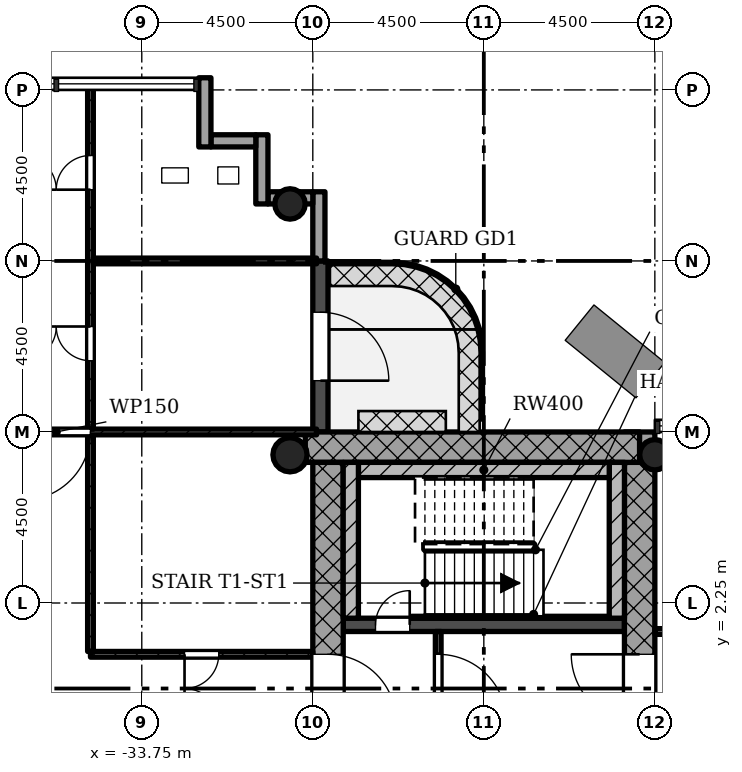
"""IFC4 building model, lengths in metres.
Left out: names, types, materials, properties, quantities, classifications, styles, units other than length and angle.
Written with IfcOpenShell. Run it as: python <this file> out.ifc"""

import sys

from ifc_helpers import new_model, si_unit, direction, frame, frame_2d, origin, origin_2d, place, context, subcontext, project, spatial, rectangle, hollow_circle, extrude, element, fill, save


model = new_model("IFC4")
c1 = context("Model", 3, precision=1e-05, world=origin(), true_north=direction((0.0, 1.0)))
c2 = subcontext(c1, "Body", "Model", "MODEL_VIEW")
j1 = project(units=[si_unit("LENGTHUNIT", "METRE"), si_unit("PLANEANGLEUNIT", "RADIAN")], contexts=[c1])
p1 = place(None, origin())
s1 = spatial("IfcSite", under=j1, at=p1, CompositionType="ELEMENT")
p2 = place(p1, origin())
s2 = spatial("IfcBuilding", under=s1, at=p2, CompositionType="ELEMENT")
p3 = place(p2, frame((0.0, 0.0, 181.3)))
s3 = spatial("IfcBuildingStorey", under=s2, at=p3, CompositionType="ELEMENT", Elevation=181.3)
p4 = place(p3, frame((-20.65, -5.95, 0.0), z_axis=(0.0, 0.0, 1.0), x_axis=(0.0, 1.0, 0.0)))
e1 = element("IfcWall", 1, at=p4, inside=s3, PredefinedType="SHEAR", context=c2, shape_type="SweptSolid", body=[
    extrude(rectangle(XDim=12.7, YDim=0.8, at=frame_2d((6.35, 0.0))), origin(), (0.0, 0.0, 1.0), 4.5),
])
p5 = place(p4, frame((5.05, 0.0, 0.0)))
e2 = element("IfcOpeningElement", 2, at=p5, cuts=e1, PredefinedType="OPENING", context=c2, shape_type="SweptSolid", body=[
    extrude(rectangle(XDim=1.8, YDim=2.1, at=frame_2d((0.9, 1.05))), frame((0.0, 0.41, 0.0), z_axis=(0.0, -1.0, 0.0), x_axis=(1.0, 0.0, 0.0)), (0.0, 0.0, 1.0), 0.82),
])
p6 = place(p3, frame((-20.652, 6.35, 0.0), z_axis=(0.0, 0.0, 1.0), x_axis=(-1.0, 0.0, 0.0)))
e3 = element("IfcWall", 3, at=p6, inside=s3, PredefinedType="SHEAR", context=c2, shape_type="SweptSolid", body=[
    extrude(rectangle(XDim=8.796, YDim=0.8, at=frame_2d((4.398, 0.0))), origin(), (0.0, 0.0, 1.0), 4.5),
])
p7 = place(p3, frame((-28.85, 5.95, 0.0), z_axis=(0.0, 0.0, 1.0), x_axis=(0.0, -1.0, 0.0)))
e4 = element("IfcWall", 4, at=p7, inside=s3, PredefinedType="SHEAR", context=c2, shape_type="SweptSolid", body=[
    extrude(rectangle(XDim=12.7, YDim=0.8, at=frame_2d((6.35, 0.0))), origin(), (0.0, 0.0, 1.0), 4.5),
])
p8 = place(p7, frame((5.05, 0.0, 0.0)))
e5 = element("IfcOpeningElement", 5, at=p8, cuts=e4, PredefinedType="OPENING", context=c2, shape_type="SweptSolid", body=[
    extrude(rectangle(XDim=1.8, YDim=2.1, at=frame_2d((0.9, 1.05))), frame((0.0, 0.41, 0.0), z_axis=(0.0, -1.0, 0.0), x_axis=(1.0, 0.0, 0.0)), (0.0, 0.0, 1.0), 0.82),
])
p9 = place(p3, frame((-28.45, 1.675, 0.0), z_axis=(0.0, 0.0, 1.0), x_axis=(1.0, 0.0, 0.0)))
e6 = element("IfcWall", 6, at=p9, inside=s3, PredefinedType="SHEAR", context=c2, shape_type="SweptSolid", body=[
    extrude(rectangle(XDim=7.4, YDim=0.35, at=frame_2d((3.7, 0.0))), origin(), (0.0, 0.0, 1.0), 4.5),
])
p10 = place(p9, frame((0.85, 0.0, 0.0)))
e7 = element("IfcOpeningElement", 7, at=p10, cuts=e6, PredefinedType="OPENING", context=c2, shape_type="SweptSolid", body=[
    extrude(rectangle(XDim=0.9, YDim=2.1, at=frame_2d((0.45, 1.05))), frame((0.0, 0.185, 0.0), z_axis=(0.0, -1.0, 0.0), x_axis=(1.0, 0.0, 0.0)), (0.0, 0.0, 1.0), 0.37),
])
for number, where, z_axis, x_axis in (
    (8, (-20.25, 6.15, 0.0), (0.0, 0.0, 1.0), (1.0, 0.0, 0.0)),
    (9, (-29.85, 12.75, 0.0), (0.0, 0.0, 1.0), (1.0, 0.0, 0.0)),
):
    element("IfcColumn", number, at=place(p3, frame(where, z_axis=z_axis, x_axis=x_axis)), inside=s3, PredefinedType="COLUMN", context=c2, shape_type="SweptSolid", body=[
        extrude(hollow_circle(Radius=0.4, WallThickness=0.028, at=origin_2d()), origin(), (0.0, 0.0, 1.0), 4.5),
    ])
p11 = place(p3, frame((-29.85, 6.15, 0.0), z_axis=(0.0, 0.0, 1.0), x_axis=(1.0, 0.0, 0.0)))
e10 = element("IfcColumn", 10, at=p11, inside=s3, PredefinedType="COLUMN", context=c2, shape_type="SweptSolid", body=[
    extrude(hollow_circle(Radius=0.45, WallThickness=0.032, at=origin_2d()), origin(), (0.0, 0.0, 1.0), 4.5),
])
p12 = place(p3, frame((-29.05, 6.75, -0.02), z_axis=(0.0, 0.0, 1.0), x_axis=(0.0, 1.0, 0.0)))
e11 = element("IfcWall", 11, at=p12, inside=s3, PredefinedType="STANDARD", context=c2, shape_type="SweptSolid", body=[
    extrude(rectangle(XDim=4.5, YDim=0.4, at=frame_2d((2.25, 0.0))), origin(), (0.0, 0.0, 1.0), 4.22),
])
p13 = place(p12, frame((1.35, 0.0, 0.02)))
e12 = element("IfcOpeningElement", 12, at=p13, cuts=e11, PredefinedType="OPENING", context=c2, shape_type="SweptSolid", body=[
    extrude(rectangle(XDim=1.8, YDim=2.1, at=frame_2d((0.9, 1.05))), frame((0.0, 0.21, 0.0), z_axis=(0.0, -1.0, 0.0), x_axis=(1.0, 0.0, 0.0)), (0.0, 0.0, 1.0), 0.42),
])
p14 = place(p3, frame((-29.09, 11.25, -0.3), z_axis=(0.0, 0.0, 1.0), x_axis=(0.0, 1.0, 0.0)))
e13 = element("IfcWall", 13, at=p14, inside=s3, PredefinedType="STANDARD", context=c2, shape_type="SweptSolid", body=[
    extrude(rectangle(XDim=1.82, YDim=0.32, at=frame_2d((0.91, 0.0))), origin(), (0.0, 0.0, 1.0), 4.5),
])
p15 = place(p3, frame((-29.25, 12.91, -0.3), z_axis=(0.0, 0.0, 1.0), x_axis=(-1.0, 0.0, 0.0)))
e14 = element("IfcWall", 14, at=p15, inside=s3, PredefinedType="STANDARD", context=c2, shape_type="SweptSolid", body=[
    extrude(rectangle(XDim=1.18, YDim=0.32, at=frame_2d((0.59, 0.0))), origin(), (0.0, 0.0, 1.0), 4.5),
])
p16 = place(p3, frame((-30.59, 12.75, -0.3), z_axis=(0.0, 0.0, 1.0), x_axis=(0.0, 1.0, 0.0)))
e15 = element("IfcWall", 15, at=p16, inside=s3, PredefinedType="STANDARD", context=c2, shape_type="SweptSolid", body=[
    extrude(rectangle(XDim=1.82, YDim=0.32, at=frame_2d((0.91, 0.0))), origin(), (0.0, 0.0, 1.0), 4.5),
])
p17 = place(p3, frame((-30.75, 14.41, -0.3), z_axis=(0.0, 0.0, 1.0), x_axis=(-1.0, 0.0, 0.0)))
e16 = element("IfcWall", 16, at=p17, inside=s3, PredefinedType="STANDARD", context=c2, shape_type="SweptSolid", body=[
    extrude(rectangle(XDim=1.18, YDim=0.32, at=frame_2d((0.59, 0.0))), origin(), (0.0, 0.0, 1.0), 4.5),
])
p18 = place(p3, frame((-32.09, 14.25, -0.3), z_axis=(0.0, 0.0, 1.0), x_axis=(0.0, 1.0, 0.0)))
e17 = element("IfcWall", 17, at=p18, inside=s3, PredefinedType="STANDARD", context=c2, shape_type="SweptSolid", body=[
    extrude(rectangle(XDim=1.82, YDim=0.32, at=frame_2d((0.91, 0.0))), origin(), (0.0, 0.0, 1.0), 4.5),
])
p19 = place(p3, frame((-25.95, -1.5, 0.0), z_axis=(0.0, 0.0, 1.0), x_axis=(0.0, 1.0, 0.0)))
e18 = element("IfcWall", 18, at=p19, inside=s3, PredefinedType="PARTITIONING", context=c2, shape_type="SweptSolid", body=[
    extrude(rectangle(XDim=3.0, YDim=0.15, at=frame_2d((1.5, 0.0))), origin(), (0.0, 0.0, 1.0), 4.08),
])
p20 = place(p19, frame((0.6, 0.0, 0.0)))
e19 = element("IfcOpeningElement", 19, at=p20, cuts=e18, PredefinedType="OPENING", context=c2, shape_type="SweptSolid", body=[
    extrude(rectangle(XDim=1.8, YDim=2.1, at=frame_2d((0.9, 1.05))), frame((0.0, 0.085, 0.0), z_axis=(0.0, -1.0, 0.0), x_axis=(1.0, 0.0, 0.0)), (0.0, 0.0, 1.0), 0.17),
])
p21 = place(p3, frame((-35.1, 0.9, 0.0), z_axis=(0.0, 0.0, 1.0), x_axis=(1.0, 0.0, 0.0)))
e20 = element("IfcWall", 20, at=p21, inside=s3, PredefinedType="PARTITIONING", context=c2, shape_type="SweptSolid", body=[
    extrude(rectangle(XDim=5.85, YDim=0.15, at=frame_2d((2.925, 0.0))), origin(), (0.0, 0.0, 1.0), 4.08),
])
p22 = place(p21, frame((2.475, 0.0, 0.0)))
e21 = element("IfcOpeningElement", 21, at=p22, cuts=e20, PredefinedType="OPENING", context=c2, shape_type="SweptSolid", body=[
    extrude(rectangle(XDim=0.9, YDim=2.1, at=frame_2d((0.45, 1.05))), frame((0.0, 0.085, 0.0), z_axis=(0.0, -1.0, 0.0), x_axis=(1.0, 0.0, 0.0)), (0.0, 0.0, 1.0), 0.17),
])
p23 = place(p3, frame((-35.1, 0.975, 0.0), z_axis=(0.0, 0.0, 1.0), x_axis=(0.0, 1.0, 0.0)))
e22 = element("IfcWall", 22, at=p23, inside=s3, PredefinedType="PARTITIONING", context=c2, shape_type="SweptSolid", body=[
    extrude(rectangle(XDim=5.7, YDim=0.15, at=frame_2d((2.85, 0.0))), origin(), (0.0, 0.0, 1.0), 4.08),
])
p24 = place(p3, frame((-20.25, 1.5, 0.0), z_axis=(0.0, 0.0, 1.0), x_axis=(1.0, 0.0, 0.0)))
e23 = element("IfcWall", 23, at=p24, inside=s3, PredefinedType="PARTITIONING", context=c2, shape_type="SweptSolid", body=[
    extrude(rectangle(XDim=9.1, YDim=0.15, at=frame_2d((4.55, 0.0))), origin(), (0.0, 0.0, 1.0), 4.08),
])
p25 = place(p24, frame((1.8, 0.0, 0.0)))
e24 = element("IfcOpeningElement", 24, at=p25, cuts=e23, PredefinedType="OPENING", context=c2, shape_type="SweptSolid", body=[
    extrude(rectangle(XDim=0.9, YDim=2.1, at=frame_2d((0.45, 1.05))), frame((0.0, 0.085, 0.0), z_axis=(0.0, -1.0, 0.0), x_axis=(1.0, 0.0, 0.0)), (0.0, 0.0, 1.0), 0.17),
])
p26 = place(p24, frame((6.3, 0.0, 0.0)))
e25 = element("IfcOpeningElement", 25, at=p26, cuts=e23, PredefinedType="OPENING", context=c2, shape_type="SweptSolid", body=[
    extrude(rectangle(XDim=0.9, YDim=2.1, at=frame_2d((0.45, 1.05))), frame((0.0, 0.085, 0.0), z_axis=(0.0, -1.0, 0.0), x_axis=(1.0, 0.0, 0.0)), (0.0, 0.0, 1.0), 0.17),
])
p27 = place(p3, frame((-42.85, 6.75, 0.0), z_axis=(0.0, 0.0, 1.0), x_axis=(1.0, 0.0, 0.0)))
e26 = element("IfcWall", 26, at=p27, inside=s3, PredefinedType="PARTITIONING", context=c2, shape_type="SweptSolid", body=[
    extrude(rectangle(XDim=13.7, YDim=0.15, at=frame_2d((6.85, 0.0))), origin(), (0.0, 0.0, 1.0), 4.08),
])
p28 = place(p27, frame((5.95, 0.0, 0.0)))
e27 = element("IfcOpeningElement", 27, at=p28, cuts=e26, PredefinedType="OPENING", context=c2, shape_type="SweptSolid", body=[
    extrude(rectangle(XDim=1.8, YDim=2.1, at=frame_2d((0.9, 1.05))), frame((0.0, 0.085, 0.0), z_axis=(0.0, -1.0, 0.0), x_axis=(1.0, 0.0, 0.0)), (0.0, 0.0, 1.0), 0.17),
])
p29 = place(p3, frame((-35.1, 6.825, 0.0), z_axis=(0.0, 0.0, 1.0), x_axis=(0.0, 1.0, 0.0)))
e28 = element("IfcWall", 28, at=p29, inside=s3, PredefinedType="PARTITIONING", context=c2, shape_type="SweptSolid", body=[
    extrude(rectangle(XDim=9.025, YDim=0.15, at=frame_2d((4.513, 0.0))), origin(), (0.0, 0.0, 1.0), 4.08),
])
p30 = place(p29, frame((1.8, 0.0, 0.0)))
e29 = element("IfcOpeningElement", 29, at=p30, cuts=e28, PredefinedType="OPENING", context=c2, shape_type="SweptSolid", body=[
    extrude(rectangle(XDim=0.9, YDim=2.1, at=frame_2d((0.45, 1.05))), frame((0.0, 0.085, 0.0), z_axis=(0.0, -1.0, 0.0), x_axis=(1.0, 0.0, 0.0)), (0.0, 0.0, 1.0), 0.17),
])
p31 = place(p29, frame((6.3, 0.0, 0.0)))
e30 = element("IfcOpeningElement", 30, at=p31, cuts=e28, PredefinedType="OPENING", context=c2, shape_type="SweptSolid", body=[
    extrude(rectangle(XDim=0.9, YDim=2.1, at=frame_2d((0.45, 1.05))), frame((0.0, 0.085, 0.0), z_axis=(0.0, -1.0, 0.0), x_axis=(1.0, 0.0, 0.0)), (0.0, 0.0, 1.0), 0.17),
])
p32 = place(p3, frame((-35.025, 11.25, 0.0), z_axis=(0.0, 0.0, 1.0), x_axis=(1.0, 0.0, 0.0)))
e31 = element("IfcWall", 31, at=p32, inside=s3, PredefinedType="PARTITIONING", context=c2, shape_type="SweptSolid", body=[
    extrude(rectangle(XDim=5.875, YDim=0.15, at=frame_2d((2.938, 0.0))), origin(), (0.0, 0.0, 1.0), 4.08),
])
p33 = place(p3, frame((-21.25, 1.85, 0.0), z_axis=(0.0, 0.0, 1.0), x_axis=(0.0, 1.0, 0.0)))
e32 = element("IfcWall", 32, at=p33, inside=s3, PredefinedType="SHEAR", context=c2, shape_type="SweptSolid", body=[
    extrude(rectangle(XDim=4.1, YDim=0.4, at=frame_2d((2.05, 0.0))), origin(), (0.0, 0.0, 1.0), 4.5),
])
p34 = place(p3, frame((-28.05, 5.75, 0.0), z_axis=(0.0, 0.0, 1.0), x_axis=(1.0, 0.0, 0.0)))
e33 = element("IfcWall", 33, at=p34, inside=s3, PredefinedType="SHEAR", context=c2, shape_type="SweptSolid", body=[
    extrude(rectangle(XDim=6.6, YDim=0.4, at=frame_2d((3.3, 0.0))), origin(), (0.0, 0.0, 1.0), 4.5),
])
p35 = place(p3, frame((-28.25, 1.85, 0.0), z_axis=(0.0, 0.0, 1.0), x_axis=(0.0, 1.0, 0.0)))
e34 = element("IfcWall", 34, at=p35, inside=s3, PredefinedType="SHEAR", context=c2, shape_type="SweptSolid", body=[
    extrude(rectangle(XDim=4.1, YDim=0.4, at=frame_2d((2.05, 0.0))), origin(), (0.0, 0.0, 1.0), 4.5),
])
p36 = place(p3, frame((-26.65, 1.875, 0.0), z_axis=(0.0, 0.0, 1.0), x_axis=(1.0, 0.0, 0.0)))
e35 = element("IfcWall", 35, at=p36, inside=s3, PredefinedType="SHEAR", context=c2, shape_type="SweptSolid", body=[
    extrude(rectangle(XDim=5.2, YDim=0.05, at=frame_2d((2.6, 0.0))), origin(), (0.0, 0.0, 1.0), 4.5),
])
p37 = place(p13, origin())
e36 = element("IfcDoor", 36, at=p37, inside=s3, OperationType="SINGLE_SWING_LEFT", PredefinedType="DOOR", context=c2, shape_type="SweptSolid", body=[
    extrude(rectangle(XDim=1.8, YDim=2.1, at=frame_2d((0.9, 1.05))), frame((0.0, 0.025, 0.0), z_axis=(0.0, -1.0, 0.0), x_axis=(1.0, 0.0, 0.0)), (0.0, 0.0, 1.0), 0.05),
])
fill(e12, e36)
p38 = place(p20, origin())
e37 = element("IfcDoor", 37, at=p38, inside=s3, OperationType="SINGLE_SWING_LEFT", PredefinedType="DOOR", context=c2, shape_type="SweptSolid", body=[
    extrude(rectangle(XDim=1.8, YDim=2.1, at=frame_2d((0.9, 1.05))), frame((0.0, 0.025, 0.0), z_axis=(0.0, -1.0, 0.0), x_axis=(1.0, 0.0, 0.0)), (0.0, 0.0, 1.0), 0.05),
])
fill(e19, e37)
p39 = place(p22, origin())
e38 = element("IfcDoor", 38, at=p39, inside=s3, OperationType="SINGLE_SWING_LEFT", PredefinedType="DOOR", context=c2, shape_type="SweptSolid", body=[
    extrude(rectangle(XDim=0.9, YDim=2.1, at=frame_2d((0.45, 1.05))), frame((0.0, 0.025, 0.0), z_axis=(0.0, -1.0, 0.0), x_axis=(1.0, 0.0, 0.0)), (0.0, 0.0, 1.0), 0.05),
])
fill(e21, e38)
p40 = place(p28, origin())
e39 = element("IfcDoor", 39, at=p40, inside=s3, OperationType="SINGLE_SWING_LEFT", PredefinedType="DOOR", context=c2, shape_type="SweptSolid", body=[
    extrude(rectangle(XDim=1.8, YDim=2.1, at=frame_2d((0.9, 1.05))), frame((0.0, 0.025, 0.0), z_axis=(0.0, -1.0, 0.0), x_axis=(1.0, 0.0, 0.0)), (0.0, 0.0, 1.0), 0.05),
])
fill(e27, e39)
p41 = place(p30, origin())
e40 = element("IfcDoor", 40, at=p41, inside=s3, OperationType="SINGLE_SWING_LEFT", PredefinedType="DOOR", context=c2, shape_type="SweptSolid", body=[
    extrude(rectangle(XDim=0.9, YDim=2.1, at=frame_2d((0.45, 1.05))), frame((0.0, 0.025, 0.0), z_axis=(0.0, -1.0, 0.0), x_axis=(1.0, 0.0, 0.0)), (0.0, 0.0, 1.0), 0.05),
])
fill(e29, e40)
p42 = place(p31, origin())
e41 = element("IfcDoor", 41, at=p42, inside=s3, OperationType="SINGLE_SWING_RIGHT", PredefinedType="DOOR", context=c2, shape_type="SweptSolid", body=[
    extrude(rectangle(XDim=0.9, YDim=2.1, at=frame_2d((0.45, 1.05))), frame((0.0, 0.025, 0.0), z_axis=(0.0, -1.0, 0.0), x_axis=(1.0, 0.0, 0.0)), (0.0, 0.0, 1.0), 0.05),
])
fill(e30, e41)
p43 = place(p10, origin())
e42 = element("IfcDoor", 42, at=p43, inside=s3, OperationType="SINGLE_SWING_LEFT", PredefinedType="DOOR", context=c2, shape_type="SweptSolid", body=[
    extrude(rectangle(XDim=0.9, YDim=2.1, at=frame_2d((0.45, 1.05))), frame((0.0, 0.025, 0.0), z_axis=(0.0, -1.0, 0.0), x_axis=(1.0, 0.0, 0.0)), (0.0, 0.0, 1.0), 0.05),
])
fill(e7, e42)
p44 = place(p8, origin())
e43 = element("IfcDoor", 43, at=p44, inside=s3, OperationType="SINGLE_SWING_LEFT", PredefinedType="DOOR", context=c2, shape_type="SweptSolid", body=[
    extrude(rectangle(XDim=1.8, YDim=2.1, at=frame_2d((0.9, 1.05))), frame((0.0, 0.025, 0.0), z_axis=(0.0, -1.0, 0.0), x_axis=(1.0, 0.0, 0.0)), (0.0, 0.0, 1.0), 0.05),
])
fill(e5, e43)
p45 = place(p5, origin())
e44 = element("IfcDoor", 44, at=p45, inside=s3, OperationType="SINGLE_SWING_LEFT", PredefinedType="DOOR", context=c2, shape_type="SweptSolid", body=[
    extrude(rectangle(XDim=1.8, YDim=2.1, at=frame_2d((0.9, 1.05))), frame((0.0, 0.025, 0.0), z_axis=(0.0, -1.0, 0.0), x_axis=(1.0, 0.0, 0.0)), (0.0, 0.0, 1.0), 0.05),
])
fill(e2, e44)
save(model, sys.argv[1])
